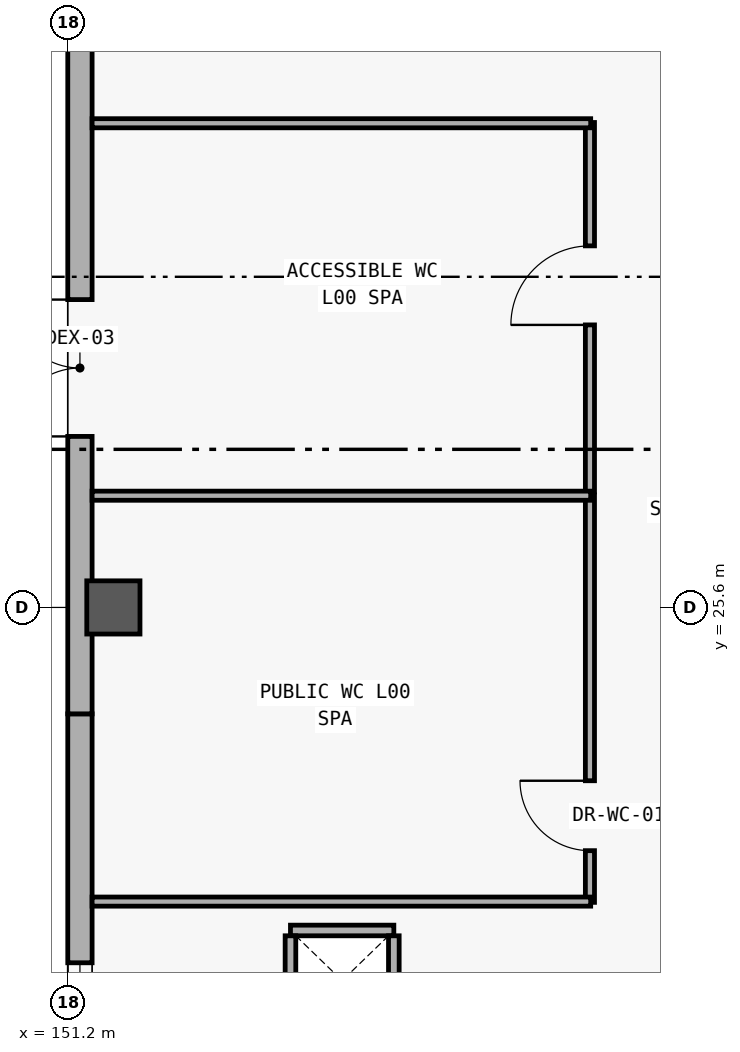
"""IFC4 building model, lengths in metres.
Left out: names, types, materials, properties, quantities, classifications, styles, units other than length and angle.
Written with IfcOpenShell. Run it as: python <this file> out.ifc"""

import sys

from ifc_helpers import new_model, si_unit, direction, frame, frame_2d, origin, origin_2d, place, context, subcontext, project, spatial, rectangle, extrude, element, fill, save


model = new_model("IFC4")
c1 = context("Model", 3, precision=1e-05, world=origin(), true_north=direction((0.0, 1.0)))
c2 = subcontext(c1, "Body", "Model", "MODEL_VIEW")
j1 = project(units=[si_unit("LENGTHUNIT", "METRE"), si_unit("PLANEANGLEUNIT", "RADIAN")], contexts=[c1])
p1 = place(None, origin())
s1 = spatial("IfcSite", under=j1, at=p1, CompositionType="ELEMENT")
p2 = place(p1, origin())
s2 = spatial("IfcBuilding", under=s1, at=p2, CompositionType="ELEMENT")
p3 = place(p2, origin())
s3 = spatial("IfcBuildingStorey", under=s2, at=p3, CompositionType="ELEMENT", Elevation=0.0)
p4 = place(p3, frame((151.8, 25.6, 0.0), z_axis=(0.0, 0.0, 1.0), x_axis=(1.0, 0.0, 0.0)))
e1 = element("IfcColumn", 1, at=p4, inside=s3, PredefinedType="COLUMN", context=c2, shape_type="SweptSolid", body=[
    extrude(rectangle(XDim=0.7, YDim=0.7, at=origin_2d()), origin(), (0.0, 0.0, 1.0), 5.4),
])
p5 = place(p3, frame((151.36, 15.1, 0.0), z_axis=(0.0, 0.0, 1.0), x_axis=(0.0, 1.0, 0.0)))
e2 = element("IfcWall", 2, at=p5, inside=s3, PredefinedType="SOLIDWALL", context=c2, shape_type="SweptSolid", body=[
    extrude(rectangle(XDim=9.1, YDim=0.32, at=frame_2d((4.55, 0.0))), origin(), (0.0, 0.0, 1.0), 5.1),
])
p6 = place(p5, frame((3.275, 0.0, 0.9)))
e3 = element("IfcOpeningElement", 3, at=p6, cuts=e2, PredefinedType="OPENING", context=c2, shape_type="SweptSolid", body=[
    extrude(rectangle(XDim=2.55, YDim=1.8, at=frame_2d((1.275, 0.9))), frame((0.0, 0.17, 0.0), z_axis=(0.0, -1.0, 0.0), x_axis=(1.0, 0.0, 0.0)), (0.0, 0.0, 1.0), 0.34),
])
p7 = place(p3, frame((151.36, 24.2, 0.0), z_axis=(0.0, 0.0, 1.0), x_axis=(0.0, 1.0, 0.0)))
e4 = element("IfcWall", 4, at=p7, inside=s3, PredefinedType="SOLIDWALL", context=c2, shape_type="SweptSolid", body=[
    extrude(rectangle(XDim=9.1, YDim=0.32, at=frame_2d((4.55, 0.0))), origin(), (0.0, 0.0, 1.0), 5.1),
])
p8 = place(p7, frame((3.65, 0.0, 0.0)))
e5 = element("IfcOpeningElement", 5, at=p8, cuts=e4, PredefinedType="OPENING", context=c2, shape_type="SweptSolid", body=[
    extrude(rectangle(XDim=1.8, YDim=2.4, at=frame_2d((0.9, 1.2))), frame((0.0, 0.17, 0.0), z_axis=(0.0, -1.0, 0.0), x_axis=(1.0, 0.0, 0.0)), (0.0, 0.0, 1.0), 0.34),
])
p9 = place(p3, frame((158.07, 21.72, 0.0), z_axis=(0.0, 0.0, 1.0), x_axis=(0.0, 1.0, 0.0)))
e6 = element("IfcWall", 6, at=p9, inside=s3, PredefinedType="PARTITIONING", context=c2, shape_type="SweptSolid", body=[
    extrude(rectangle(XDim=5.36, YDim=0.12, at=frame_2d((2.68, 0.0))), origin(), (0.0, 0.0, 1.0), 4.18),
])
p10 = place(p9, frame((0.68, 0.0, 0.0)))
e7 = element("IfcOpeningElement", 7, at=p10, cuts=e6, PredefinedType="OPENING", context=c2, shape_type="SweptSolid", body=[
    extrude(rectangle(XDim=0.92, YDim=2.15, at=frame_2d((0.46, 1.075))), frame((0.0, 0.07, 0.0), z_axis=(0.0, -1.0, 0.0), x_axis=(1.0, 0.0, 0.0)), (0.0, 0.0, 1.0), 0.14),
])
p11 = place(p3, frame((158.07, 27.12, 0.0), z_axis=(0.0, 0.0, 1.0), x_axis=(0.0, 1.0, 0.0)))
e8 = element("IfcWall", 8, at=p11, inside=s3, PredefinedType="PARTITIONING", context=c2, shape_type="SweptSolid", body=[
    extrude(rectangle(XDim=4.86, YDim=0.12, at=frame_2d((2.43, 0.0))), origin(), (0.0, 0.0, 1.0), 4.18),
])
p12 = place(p11, frame((2.197, 0.0, 0.0)))
e9 = element("IfcOpeningElement", 9, at=p12, cuts=e8, PredefinedType="OPENING", context=c2, shape_type="SweptSolid", body=[
    extrude(rectangle(XDim=1.04, YDim=2.15, at=frame_2d((0.52, 1.075))), frame((0.0, 0.07, 0.0), z_axis=(0.0, -1.0, 0.0), x_axis=(1.0, 0.0, 0.0)), (0.0, 0.0, 1.0), 0.14),
])
for number, where, z_axis, x_axis in (
    (10, (151.52, 21.73, 0.0), (0.0, 0.0, 1.0), (1.0, 0.0, 0.0)),
    (11, (151.52, 27.07, 0.0), (0.0, 0.0, 1.0), (1.0, 0.0, 0.0)),
    (12, (151.52, 31.97, 0.0), (0.0, 0.0, 1.0), (1.0, 0.0, 0.0)),
):
    element("IfcWall", number, at=place(p3, frame(where, z_axis=z_axis, x_axis=x_axis)), inside=s3, PredefinedType="PARTITIONING", context=c2, shape_type="SweptSolid", body=[
        extrude(rectangle(XDim=6.56, YDim=0.12, at=frame_2d((3.28, 0.0))), origin(), (0.0, 0.0, 1.0), 4.18),
    ])
p13 = place(p3, frame((155.49, 21.35, 0.0), z_axis=(0.0, 0.0, 1.0), x_axis=(-1.0, 0.0, 0.0)))
e13 = element("IfcWall", 13, at=p13, inside=s3, PredefinedType="PARTITIONING", context=c2, shape_type="SweptSolid", body=[
    extrude(rectangle(XDim=1.36, YDim=0.14, at=frame_2d((0.68, 0.0))), origin(), (0.0, 0.0, 1.0), 4.2),
])
for number, where, z_axis, x_axis in (
    (14, (154.13, 21.28, 0.0), (0.0, 0.0, 1.0), (0.0, -1.0, 0.0)),
    (15, (155.49, 20.1, 0.0), (0.0, 0.0, 1.0), (0.0, 1.0, 0.0)),
):
    element("IfcWall", number, at=place(p3, frame(where, z_axis=z_axis, x_axis=x_axis)), inside=s3, PredefinedType="PARTITIONING", context=c2, shape_type="SweptSolid", body=[
        extrude(rectangle(XDim=1.18, YDim=0.14, at=frame_2d((0.59, 0.0))), origin(), (0.0, 0.0, 1.0), 4.2),
    ])
p14 = place(p6, origin())
e16 = element("IfcWindow", 16, at=p14, inside=s3, PartitioningType="SINGLE_PANEL", PredefinedType="WINDOW", context=c2, shape_type="SweptSolid", body=[
    extrude(rectangle(XDim=2.55, YDim=1.8, at=frame_2d((1.275, 0.9))), frame((0.0, 0.03, 0.0), z_axis=(0.0, -1.0, 0.0), x_axis=(1.0, 0.0, 0.0)), (0.0, 0.0, 1.0), 0.06),
])
fill(e3, e16)
p15 = place(p8, origin())
e17 = element("IfcDoor", 17, at=p15, inside=s3, OperationType="DOUBLE_DOOR_SINGLE_SWING", PredefinedType="DOOR", context=c2, shape_type="SweptSolid", body=[
    extrude(rectangle(XDim=1.8, YDim=2.4, at=frame_2d((0.9, 1.2))), frame((0.0, 0.025, 0.0), z_axis=(0.0, -1.0, 0.0), x_axis=(1.0, 0.0, 0.0)), (0.0, 0.0, 1.0), 0.05),
])
fill(e5, e17)
p16 = place(p10, origin())
e18 = element("IfcDoor", 18, at=p16, inside=s3, OperationType="SINGLE_SWING_RIGHT", PredefinedType="DOOR", context=c2, shape_type="SweptSolid", body=[
    extrude(rectangle(XDim=0.92, YDim=2.15, at=frame_2d((0.46, 1.075))), frame((0.0, 0.025, 0.0), z_axis=(0.0, -1.0, 0.0), x_axis=(1.0, 0.0, 0.0)), (0.0, 0.0, 1.0), 0.05),
])
fill(e7, e18)
p17 = place(p12, origin())
e19 = element("IfcDoor", 19, at=p17, inside=s3, OperationType="SINGLE_SWING_LEFT", PredefinedType="DOOR", context=c2, shape_type="SweptSolid", body=[
    extrude(rectangle(XDim=1.04, YDim=2.15, at=frame_2d((0.52, 1.075))), frame((0.0, 0.025, 0.0), z_axis=(0.0, -1.0, 0.0), x_axis=(1.0, 0.0, 0.0)), (0.0, 0.0, 1.0), 0.05),
])
fill(e9, e19)
save(model, sys.argv[1])
